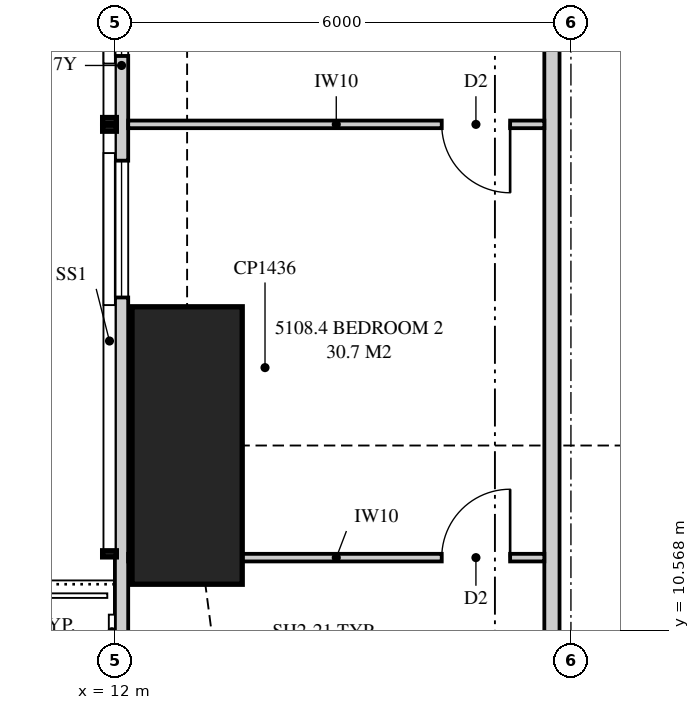
"""IFC4 building model, lengths in metres.
Left out: names, types, materials, properties, quantities, classifications, styles, units other than length and angle.
Written with IfcOpenShell. Run it as: python <this file> out.ifc"""

import sys

from ifc_helpers import new_model, si_unit, direction, frame, frame_2d, origin, origin_2d, place, context, subcontext, project, spatial, polyline, rectangle, outline, extrude, element, fill, save


model = new_model("IFC4")
c1 = context("Model", 3, precision=1e-05, world=origin(), true_north=direction((0.0, 1.0)))
c2 = subcontext(c1, "Body", "Model", "MODEL_VIEW")
j1 = project(units=[si_unit("LENGTHUNIT", "METRE"), si_unit("PLANEANGLEUNIT", "RADIAN")], contexts=[c1])
p1 = place(None, origin())
s1 = spatial("IfcSite", under=j1, at=p1, CompositionType="ELEMENT")
p2 = place(p1, origin())
s2 = spatial("IfcBuilding", under=s1, at=p2, CompositionType="ELEMENT")
p3 = place(p2, frame((0.0, 0.0, 187.85)))
s3 = spatial("IfcBuildingStorey", under=s2, at=p3, CompositionType="ELEMENT", Elevation=187.85)
p4 = place(p3, frame((12.95, 13.0, 0.0), z_axis=(0.0, 0.0, 1.0), x_axis=(1.0, 0.0, 0.0)))
e1 = element("IfcColumn", 1, at=p4, inside=s3, PredefinedType="COLUMN", context=c2, shape_type="SweptSolid", body=[
    extrude(rectangle(XDim=1.45, YDim=3.65, at=origin_2d()), origin(), (0.0, 0.0, 1.0), 3.35),
])
p5 = place(p3, frame((12.087, 32.949, 0.0), z_axis=(0.0, 0.0, 1.0), x_axis=(0.0, -1.0, 0.0)))
e2 = element("IfcWall", 2, at=p5, inside=s3, PredefinedType="SOLIDWALL", context=c2, shape_type="SweptSolid", body=[
    extrude(outline(polyline([(0.0, 0.0), (29.897, 0.0), (29.897, 3.11), (20.191, 3.11), (20.191, 2.15), (20.051, 2.15), (20.051, 3.11), (19.949, 3.11), (19.949, 2.15), (7.949, 2.15), (7.949, 3.11), (7.823, 3.11), (7.823, 2.15), (7.73, 2.15), (7.73, 3.11), (0.0, 3.11), (0.0, 0.0)])), frame((0.0, 0.087, 0.0), z_axis=(0.0, -1.0, 0.0), x_axis=(1.0, 0.0, 0.0)), (0.0, 0.0, 1.0), 0.175),
])
p6 = place(p5, frame((1.599, 0.0, 0.4)))
e3 = element("IfcOpeningElement", 3, at=p6, cuts=e2, PredefinedType="OPENING", context=c2, shape_type="SweptSolid", body=[
    extrude(rectangle(XDim=1.2, YDim=1.7, at=frame_2d((0.6, 0.85))), frame((0.0, 0.097, 0.0), z_axis=(0.0, -1.0, 0.0), x_axis=(1.0, 0.0, 0.0)), (0.0, 0.0, 1.0), 0.195),
])
p7 = place(p5, frame((9.899, 0.0, 0.4)))
e4 = element("IfcOpeningElement", 4, at=p7, cuts=e2, PredefinedType="OPENING", context=c2, shape_type="SweptSolid", body=[
    extrude(rectangle(XDim=1.8, YDim=1.7, at=frame_2d((0.9, 0.85))), frame((0.0, 0.097, 0.0), z_axis=(0.0, -1.0, 0.0), x_axis=(1.0, 0.0, 0.0)), (0.0, 0.0, 1.0), 0.195),
])
p8 = place(p5, frame((13.024, 0.0, 0.4)))
e5 = element("IfcOpeningElement", 5, at=p8, cuts=e2, PredefinedType="OPENING", context=c2, shape_type="SweptSolid", body=[
    extrude(rectangle(XDim=1.8, YDim=1.7, at=frame_2d((0.9, 0.85))), frame((0.0, 0.097, 0.0), z_axis=(0.0, -1.0, 0.0), x_axis=(1.0, 0.0, 0.0)), (0.0, 0.0, 1.0), 0.195),
])
p9 = place(p5, frame((16.201, 0.0, 0.4)))
e6 = element("IfcOpeningElement", 6, at=p9, cuts=e2, PredefinedType="OPENING", context=c2, shape_type="SweptSolid", body=[
    extrude(rectangle(XDim=1.8, YDim=1.7, at=frame_2d((0.9, 0.85))), frame((0.0, 0.097, 0.0), z_axis=(0.0, -1.0, 0.0), x_axis=(1.0, 0.0, 0.0)), (0.0, 0.0, 1.0), 0.195),
])
p10 = place(p5, frame((22.624, 0.0, 0.0)))
e7 = element("IfcOpeningElement", 7, at=p10, cuts=e2, PredefinedType="OPENING", context=c2, shape_type="SweptSolid", body=[
    extrude(rectangle(XDim=1.8, YDim=2.1, at=frame_2d((0.9, 1.05))), frame((0.0, 0.097, 0.0), z_axis=(0.0, -1.0, 0.0), x_axis=(1.0, 0.0, 0.0)), (0.0, 0.0, 1.0), 0.195),
])
p11 = place(p3, frame((17.75, 7.925, 0.0), z_axis=(0.0, 0.0, 1.0), x_axis=(0.0, 1.0, 0.0)))
e8 = element("IfcWall", 8, at=p11, inside=s3, PredefinedType="PARTITIONING", context=c2, shape_type="SweptSolid", body=[
    extrude(outline(polyline([(0.0, 0.0), (21.15, 0.0), (21.15, 3.11), (17.412, 3.11), (17.412, 2.541), (16.738, 2.541), (16.738, 3.11), (5.412, 3.11), (5.412, 2.541), (4.738, 2.541), (4.738, 3.11), (0.0, 3.11), (0.0, 0.0)])), frame((0.0, 0.1, 0.0), z_axis=(0.0, -1.0, 0.0), x_axis=(1.0, 0.0, 0.0)), (0.0, 0.0, 1.0), 0.2),
])
p12 = place(p11, frame((16.25, 0.0, 0.0)))
e9 = element("IfcOpeningElement", 9, at=p12, cuts=e8, PredefinedType="OPENING", context=c2, shape_type="SweptSolid", body=[
    extrude(rectangle(XDim=1.05, YDim=2.2, at=frame_2d((0.525, 1.1))), frame((0.0, 0.11, 0.0), z_axis=(0.0, -1.0, 0.0), x_axis=(1.0, 0.0, 0.0)), (0.0, 0.0, 1.0), 0.22),
])
p13 = place(p3, frame((12.175, 11.525, 0.0), z_axis=(0.0, 0.0, 1.0), x_axis=(1.0, 0.0, 0.0)))
e10 = element("IfcWall", 10, at=p13, inside=s3, PredefinedType="PARTITIONING", context=c2, shape_type="SweptSolid", body=[
    extrude(outline(polyline([(0.0, 0.0), (5.475, 0.0), (5.475, 3.11), (1.836, 3.11), (1.836, 2.15), (0.101, 2.15), (0.101, 3.11), (0.0, 3.11), (0.0, 0.0)])), frame((0.0, 0.05, 0.0), z_axis=(0.0, -1.0, 0.0), x_axis=(1.0, 0.0, 0.0)), (0.0, 0.0, 1.0), 0.1),
])
p14 = place(p13, frame((4.125, 0.0, 0.0)))
e11 = element("IfcOpeningElement", 11, at=p14, cuts=e10, PredefinedType="OPENING", context=c2, shape_type="SweptSolid", body=[
    extrude(rectangle(XDim=0.9, YDim=2.1, at=frame_2d((0.45, 1.05))), frame((0.0, 0.06, 0.0), z_axis=(0.0, -1.0, 0.0), x_axis=(1.0, 0.0, 0.0)), (0.0, 0.0, 1.0), 0.12),
])
p15 = place(p3, frame((12.175, 17.225, 0.0), z_axis=(0.0, 0.0, 1.0), x_axis=(1.0, 0.0, 0.0)))
e12 = element("IfcWall", 12, at=p15, inside=s3, PredefinedType="PARTITIONING", context=c2, shape_type="SweptSolid", body=[
    extrude(outline(polyline([(0.0, 0.0), (5.475, 0.0), (5.475, 3.11), (1.635, 3.11), (1.635, 2.15), (0.0, 2.15), (0.0, 3.11), (0.0, 0.0)])), frame((0.0, 0.05, 0.0), z_axis=(0.0, -1.0, 0.0), x_axis=(1.0, 0.0, 0.0)), (0.0, 0.0, 1.0), 0.1),
])
p16 = place(p15, frame((4.125, 0.0, 0.0)))
e13 = element("IfcOpeningElement", 13, at=p16, cuts=e12, PredefinedType="OPENING", context=c2, shape_type="SweptSolid", body=[
    extrude(rectangle(XDim=0.9, YDim=2.1, at=frame_2d((0.45, 1.05))), frame((0.0, 0.06, 0.0), z_axis=(0.0, -1.0, 0.0), x_axis=(1.0, 0.0, 0.0)), (0.0, 0.0, 1.0), 0.12),
])
p17 = place(p8, origin())
e14 = element("IfcWindow", 14, at=p17, inside=s3, PartitioningType="SINGLE_PANEL", PredefinedType="WINDOW", context=c2, shape_type="SweptSolid", body=[
    extrude(rectangle(XDim=1.8, YDim=1.7, at=frame_2d((0.9, 0.85))), frame((0.0, 0.03, 0.0), z_axis=(0.0, -1.0, 0.0), x_axis=(1.0, 0.0, 0.0)), (0.0, 0.0, 1.0), 0.06),
])
fill(e5, e14)
p18 = place(p9, origin())
e15 = element("IfcWindow", 15, at=p18, inside=s3, PartitioningType="SINGLE_PANEL", PredefinedType="WINDOW", context=c2, shape_type="SweptSolid", body=[
    extrude(rectangle(XDim=1.8, YDim=1.7, at=frame_2d((0.9, 0.85))), frame((0.0, 0.03, 0.0), z_axis=(0.0, -1.0, 0.0), x_axis=(1.0, 0.0, 0.0)), (0.0, 0.0, 1.0), 0.06),
])
fill(e6, e15)
p19 = place(p14, origin())
e16 = element("IfcDoor", 16, at=p19, inside=s3, OperationType="SINGLE_SWING_RIGHT", PredefinedType="DOOR", context=c2, shape_type="SweptSolid", body=[
    extrude(rectangle(XDim=0.9, YDim=2.1, at=frame_2d((0.45, 1.05))), frame((0.0, 0.025, 0.0), z_axis=(0.0, -1.0, 0.0), x_axis=(1.0, 0.0, 0.0)), (0.0, 0.0, 1.0), 0.05),
])
fill(e11, e16)
p20 = place(p16, frame((0.9, 0.0, 0.0), z_axis=(0.0, 0.0, 1.0), x_axis=(-1.0, 0.0, 0.0)))
e17 = element("IfcDoor", 17, at=p20, inside=s3, OperationType="SINGLE_SWING_LEFT", PredefinedType="DOOR", context=c2, shape_type="SweptSolid", body=[
    extrude(rectangle(XDim=0.9, YDim=2.1, at=frame_2d((0.45, 1.05))), frame((0.0, 0.025, 0.0), z_axis=(0.0, -1.0, 0.0), x_axis=(1.0, 0.0, 0.0)), (0.0, 0.0, 1.0), 0.05),
])
fill(e13, e17)
save(model, sys.argv[1])
